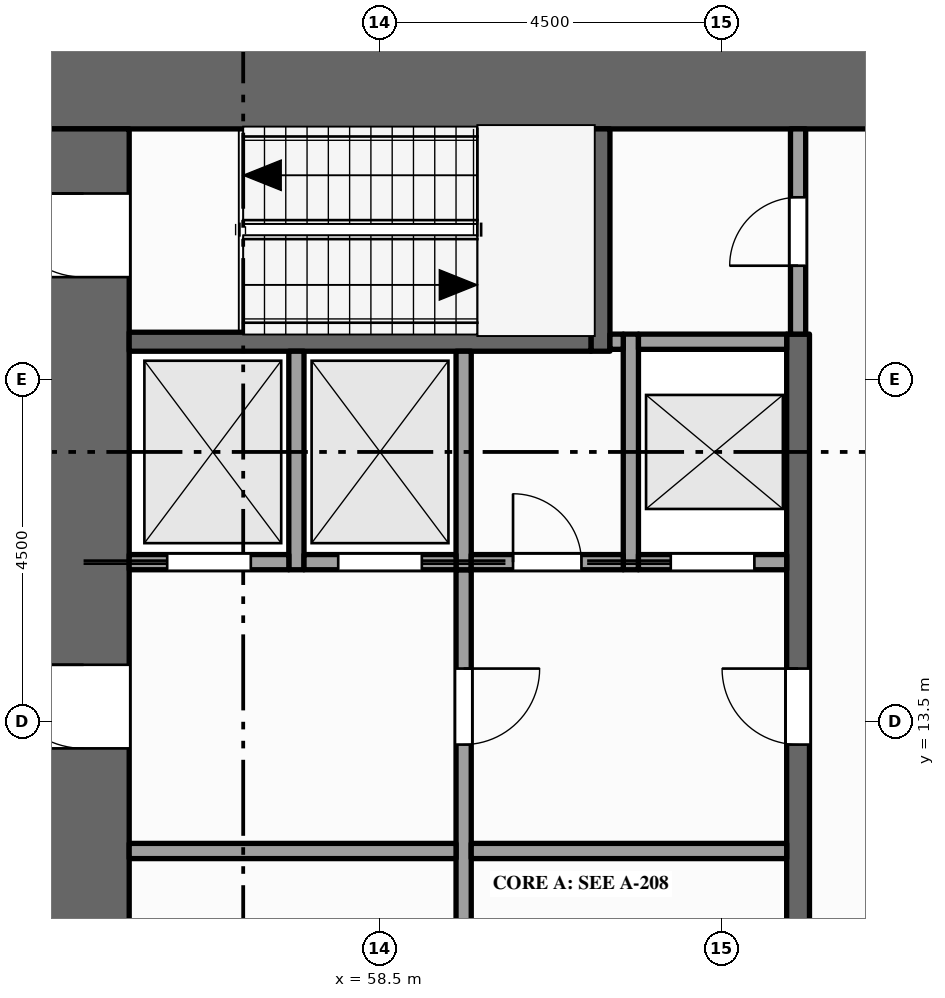
"""IFC4 building model, lengths in metres.
Left out: names, types, materials, properties, quantities, classifications, styles, units other than length and angle.
Written with IfcOpenShell. Run it as: python <this file> out.ifc"""

import sys

from ifc_helpers import new_model, si_unit, direction, frame, frame_2d, origin, place, context, subcontext, project, spatial, rectangle, extrude, element, fill, save


model = new_model("IFC4")
c1 = context("Model", 3, precision=1e-05, world=origin(), true_north=direction((0.0, 1.0)))
c2 = subcontext(c1, "Body", "Model", "MODEL_VIEW")
j1 = project(units=[si_unit("LENGTHUNIT", "METRE"), si_unit("PLANEANGLEUNIT", "RADIAN")], contexts=[c1])
p1 = place(None, origin())
s1 = spatial("IfcSite", under=j1, at=p1, CompositionType="ELEMENT")
p2 = place(p1, origin())
s2 = spatial("IfcBuilding", under=s1, at=p2, CompositionType="ELEMENT")
p3 = place(p2, frame((0.0, 0.0, 41.0)))
s3 = spatial("IfcBuildingStorey", under=s2, at=p3, CompositionType="ELEMENT", Elevation=41.0)
p4 = place(p3, frame((54.0, 21.9, -0.15), z_axis=(0.0, 0.0, 1.0), x_axis=(1.0, 0.0, 0.0)))
e1 = element("IfcWall", 1, at=p4, inside=s3, PredefinedType="SHEAR", context=c2, shape_type="SweptSolid", body=[
    extrude(rectangle(XDim=13.5, YDim=1.2, at=frame_2d((6.75, 0.0))), origin(), (0.0, 0.0, 1.0), 4.0),
])
p5 = place(p3, frame((54.6, 1.2, -0.15), z_axis=(0.0, 0.0, 1.0), x_axis=(0.0, 1.0, 0.0)))
e2 = element("IfcWall", 2, at=p5, inside=s3, PredefinedType="SHEAR", context=c2, shape_type="SweptSolid", body=[
    extrude(rectangle(XDim=20.1, YDim=1.2, at=frame_2d((10.05, 0.0))), origin(), (0.0, 0.0, 1.0), 4.0),
])
p6 = place(p5, frame((5.9, 0.0, 0.15)))
e3 = element("IfcOpeningElement", 3, at=p6, cuts=e2, PredefinedType="OPENING", context=c2, shape_type="SweptSolid", body=[
    extrude(rectangle(XDim=1.8, YDim=2.1, at=frame_2d((0.9, 1.05))), frame((0.0, 0.61, 0.0), z_axis=(0.0, -1.0, 0.0), x_axis=(1.0, 0.0, 0.0)), (0.0, 0.0, 1.0), 1.22),
])
p7 = place(p5, frame((11.95, 0.0, 0.15)))
e4 = element("IfcOpeningElement", 4, at=p7, cuts=e2, PredefinedType="OPENING", context=c2, shape_type="SweptSolid", body=[
    extrude(rectangle(XDim=1.1, YDim=2.1, at=frame_2d((0.55, 1.05))), frame((0.0, 0.61, 0.0), z_axis=(0.0, -1.0, 0.0), x_axis=(1.0, 0.0, 0.0)), (0.0, 0.0, 1.0), 1.22),
])
p8 = place(p5, frame((0.95, 0.0, 0.15)))
e5 = element("IfcOpeningElement", 5, at=p8, cuts=e2, PredefinedType="OPENING", context=c2, shape_type="SweptSolid", body=[
    extrude(rectangle(XDim=1.1, YDim=2.1, at=frame_2d((0.55, 1.05))), frame((0.0, 0.61, 0.0), z_axis=(0.0, -1.0, 0.0), x_axis=(1.0, 0.0, 0.0)), (0.0, 0.0, 1.0), 1.22),
])
p9 = place(p5, frame((18.15, 0.0, 0.15)))
e6 = element("IfcOpeningElement", 6, at=p9, cuts=e2, PredefinedType="OPENING", context=c2, shape_type="SweptSolid", body=[
    extrude(rectangle(XDim=1.1, YDim=2.1, at=frame_2d((0.55, 1.05))), frame((0.0, 0.61, 0.0), z_axis=(0.0, -1.0, 0.0), x_axis=(1.0, 0.0, 0.0)), (0.0, 0.0, 1.0), 1.22),
])
p10 = place(p3, frame((57.4, 15.5, 0.0), z_axis=(0.0, 0.0, 1.0), x_axis=(0.0, 1.0, 0.0)))
e7 = element("IfcWall", 7, at=p10, inside=s3, PredefinedType="SOLIDWALL", context=c2, shape_type="SweptSolid", body=[
    extrude(rectangle(XDim=2.875, YDim=0.2, at=frame_2d((1.438, 0.0))), origin(), (0.0, 0.0, 1.0), 3.85),
])
p11 = place(p3, frame((59.6, 9.3, 0.0), z_axis=(0.0, 0.0, 1.0), x_axis=(0.0, 1.0, 0.0)))
e8 = element("IfcWall", 8, at=p11, inside=s3, PredefinedType="PARTITIONING", context=c2, shape_type="SweptSolid", body=[
    extrude(rectangle(XDim=6.2, YDim=0.2, at=frame_2d((3.1, 0.0))), origin(), (0.0, 0.0, 1.0), 3.85),
])
p12 = place(p11, frame((3.9, 0.0, 0.0)))
e9 = element("IfcOpeningElement", 9, at=p12, cuts=e8, PredefinedType="OPENING", context=c2, shape_type="SweptSolid", body=[
    extrude(rectangle(XDim=1.0, YDim=2.1, at=frame_2d((0.5, 1.05))), frame((0.0, 0.11, 0.0), z_axis=(0.0, -1.0, 0.0), x_axis=(1.0, 0.0, 0.0)), (0.0, 0.0, 1.0), 0.22),
])
p13 = place(p3, frame((59.6, 15.5, 0.0), z_axis=(0.0, 0.0, 1.0), x_axis=(0.0, 1.0, 0.0)))
e10 = element("IfcWall", 10, at=p13, inside=s3, PredefinedType="SOLIDWALL", context=c2, shape_type="SweptSolid", body=[
    extrude(rectangle(XDim=2.875, YDim=0.2, at=frame_2d((1.438, 0.0))), origin(), (0.0, 0.0, 1.0), 3.85),
])
p14 = place(p3, frame((61.4, 18.375, 0.0), z_axis=(0.0, 0.0, 1.0), x_axis=(0.0, 1.0, 0.0)))
e11 = element("IfcWall", 11, at=p14, inside=s3, PredefinedType="SHEAR", context=c2, shape_type="SweptSolid", body=[
    extrude(rectangle(XDim=2.925, YDim=0.25, at=frame_2d((1.462, 0.0))), origin(), (0.0, 0.0, 1.0), 3.85),
])
p15 = place(p3, frame((61.8, 15.5, 0.0), z_axis=(0.0, 0.0, 1.0), x_axis=(0.0, 1.0, 0.0)))
e12 = element("IfcWall", 12, at=p15, inside=s3, PredefinedType="SOLIDWALL", context=c2, shape_type="SweptSolid", body=[
    extrude(rectangle(XDim=3.1, YDim=0.2, at=frame_2d((1.55, 0.0))), origin(), (0.0, 0.0, 1.0), 3.85),
])
p16 = place(p3, frame((64.0, 4.1, 0.0), z_axis=(0.0, 0.0, 1.0), x_axis=(0.0, 1.0, 0.0)))
e13 = element("IfcWall", 13, at=p16, inside=s3, PredefinedType="SHEAR", context=c2, shape_type="SweptSolid", body=[
    extrude(rectangle(XDim=14.5, YDim=0.3, at=frame_2d((7.25, 0.0))), origin(), (0.0, 0.0, 1.0), 3.85),
])
p17 = place(p16, frame((3.4, 0.0, 0.0)))
e14 = element("IfcOpeningElement", 14, at=p17, cuts=e13, PredefinedType="OPENING", context=c2, shape_type="SweptSolid", body=[
    extrude(rectangle(XDim=1.0, YDim=2.1, at=frame_2d((0.5, 1.05))), frame((0.0, 0.16, 0.0), z_axis=(0.0, -1.0, 0.0), x_axis=(1.0, 0.0, 0.0)), (0.0, 0.0, 1.0), 0.32),
])
p18 = place(p16, frame((9.1, 0.0, 0.0)))
e15 = element("IfcOpeningElement", 15, at=p18, cuts=e13, PredefinedType="OPENING", context=c2, shape_type="SweptSolid", body=[
    extrude(rectangle(XDim=1.0, YDim=2.1, at=frame_2d((0.5, 1.05))), frame((0.0, 0.16, 0.0), z_axis=(0.0, -1.0, 0.0), x_axis=(1.0, 0.0, 0.0)), (0.0, 0.0, 1.0), 0.32),
])
p19 = place(p3, frame((64.0, 18.6, 0.0), z_axis=(0.0, 0.0, 1.0), x_axis=(0.0, 1.0, 0.0)))
e16 = element("IfcWall", 16, at=p19, inside=s3, PredefinedType="PARTITIONING", context=c2, shape_type="SweptSolid", body=[
    extrude(rectangle(XDim=2.7, YDim=0.2, at=frame_2d((1.35, 0.0))), origin(), (0.0, 0.0, 1.0), 3.85),
])
p20 = place(p19, frame((0.9, 0.0, 0.0)))
e17 = element("IfcOpeningElement", 17, at=p20, cuts=e16, PredefinedType="OPENING", context=c2, shape_type="SweptSolid", body=[
    extrude(rectangle(XDim=0.9, YDim=2.1, at=frame_2d((0.45, 1.05))), frame((0.0, 0.11, 0.0), z_axis=(0.0, -1.0, 0.0), x_axis=(1.0, 0.0, 0.0)), (0.0, 0.0, 1.0), 0.22),
])
p21 = place(p3, frame((55.2, 11.8, 0.0), z_axis=(0.0, 0.0, 1.0), x_axis=(1.0, 0.0, 0.0)))
e18 = element("IfcWall", 18, at=p21, inside=s3, PredefinedType="PARTITIONING", context=c2, shape_type="SweptSolid", body=[
    extrude(rectangle(XDim=4.3, YDim=0.2, at=frame_2d((2.15, 0.0))), origin(), (0.0, 0.0, 1.0), 3.85),
])
p22 = place(p3, frame((59.7, 11.8, 0.0), z_axis=(0.0, 0.0, 1.0), x_axis=(1.0, 0.0, 0.0)))
e19 = element("IfcWall", 19, at=p22, inside=s3, PredefinedType="PARTITIONING", context=c2, shape_type="SweptSolid", body=[
    extrude(rectangle(XDim=4.15, YDim=0.2, at=frame_2d((2.075, 0.0))), origin(), (0.0, 0.0, 1.0), 3.85),
])
p23 = place(p3, frame((55.2, 15.6, 0.0), z_axis=(0.0, 0.0, 1.0), x_axis=(1.0, 0.0, 0.0)))
e20 = element("IfcWall", 20, at=p23, inside=s3, PredefinedType="SOLIDWALL", context=c2, shape_type="SweptSolid", body=[
    extrude(rectangle(XDim=2.1, YDim=0.2, at=frame_2d((1.05, 0.0))), origin(), (0.0, 0.0, 1.0), 3.85),
])
p24 = place(p23, frame((0.5, 0.0, 0.012)))
e21 = element("IfcOpeningElement", 21, at=p24, cuts=e20, PredefinedType="OPENING", context=c2, shape_type="SweptSolid", body=[
    extrude(rectangle(XDim=1.1, YDim=2.1, at=frame_2d((0.55, 1.05))), frame((0.0, 0.11, 0.0), z_axis=(0.0, -1.0, 0.0), x_axis=(1.0, 0.0, 0.0)), (0.0, 0.0, 1.0), 0.22),
])
p25 = place(p3, frame((57.5, 15.6, 0.0), z_axis=(0.0, 0.0, 1.0), x_axis=(1.0, 0.0, 0.0)))
e22 = element("IfcWall", 22, at=p25, inside=s3, PredefinedType="SOLIDWALL", context=c2, shape_type="SweptSolid", body=[
    extrude(rectangle(XDim=2.0, YDim=0.2, at=frame_2d((1.0, 0.0))), origin(), (0.0, 0.0, 1.0), 3.85),
])
p26 = place(p25, frame((0.45, 0.0, 0.012)))
e23 = element("IfcOpeningElement", 23, at=p26, cuts=e22, PredefinedType="OPENING", context=c2, shape_type="SweptSolid", body=[
    extrude(rectangle(XDim=1.1, YDim=2.1, at=frame_2d((0.55, 1.05))), frame((0.0, 0.11, 0.0), z_axis=(0.0, -1.0, 0.0), x_axis=(1.0, 0.0, 0.0)), (0.0, 0.0, 1.0), 0.22),
])
p27 = place(p3, frame((59.7, 15.6, 0.0), z_axis=(0.0, 0.0, 1.0), x_axis=(1.0, 0.0, 0.0)))
e24 = element("IfcWall", 24, at=p27, inside=s3, PredefinedType="PARTITIONING", context=c2, shape_type="SweptSolid", body=[
    extrude(rectangle(XDim=2.0, YDim=0.2, at=frame_2d((1.0, 0.0))), origin(), (0.0, 0.0, 1.0), 3.85),
])
p28 = place(p27, frame((0.55, 0.0, 0.0)))
e25 = element("IfcOpeningElement", 25, at=p28, cuts=e24, PredefinedType="OPENING", context=c2, shape_type="SweptSolid", body=[
    extrude(rectangle(XDim=0.9, YDim=2.1, at=frame_2d((0.45, 1.05))), frame((0.0, 0.11, 0.0), z_axis=(0.0, -1.0, 0.0), x_axis=(1.0, 0.0, 0.0)), (0.0, 0.0, 1.0), 0.22),
])
p29 = place(p3, frame((61.9, 15.6, 0.0), z_axis=(0.0, 0.0, 1.0), x_axis=(1.0, 0.0, 0.0)))
e26 = element("IfcWall", 26, at=p29, inside=s3, PredefinedType="SOLIDWALL", context=c2, shape_type="SweptSolid", body=[
    extrude(rectangle(XDim=1.95, YDim=0.2, at=frame_2d((0.975, 0.0))), origin(), (0.0, 0.0, 1.0), 3.85),
])
p30 = place(p29, frame((0.425, 0.0, 0.012)))
e27 = element("IfcOpeningElement", 27, at=p30, cuts=e26, PredefinedType="OPENING", context=c2, shape_type="SweptSolid", body=[
    extrude(rectangle(XDim=1.1, YDim=2.1, at=frame_2d((0.55, 1.05))), frame((0.0, 0.11, 0.0), z_axis=(0.0, -1.0, 0.0), x_axis=(1.0, 0.0, 0.0)), (0.0, 0.0, 1.0), 0.22),
])
p31 = place(p3, frame((55.2, 18.5, 0.0), z_axis=(0.0, 0.0, 1.0), x_axis=(1.0, 0.0, 0.0)))
e28 = element("IfcWall", 28, at=p31, inside=s3, PredefinedType="SHEAR", context=c2, shape_type="SweptSolid", body=[
    extrude(rectangle(XDim=6.075, YDim=0.25, at=frame_2d((3.038, 0.0))), origin(), (0.0, 0.0, 1.0), 3.85),
])
p32 = place(p3, frame((61.525, 18.5, 0.0), z_axis=(0.0, 0.0, 1.0), x_axis=(1.0, 0.0, 0.0)))
e29 = element("IfcWall", 29, at=p32, inside=s3, PredefinedType="PARTITIONING", context=c2, shape_type="SweptSolid", body=[
    extrude(rectangle(XDim=0.175, YDim=0.2, at=frame_2d((0.087, 0.0))), origin(), (0.0, 0.0, 1.0), 3.85),
])
p33 = place(p3, frame((61.9, 18.5, 0.0), z_axis=(0.0, 0.0, 1.0), x_axis=(1.0, 0.0, 0.0)))
e30 = element("IfcWall", 30, at=p33, inside=s3, PredefinedType="SOLIDWALL", context=c2, shape_type="SweptSolid", body=[
    extrude(rectangle(XDim=1.95, YDim=0.2, at=frame_2d((0.975, 0.0))), origin(), (0.0, 0.0, 1.0), 3.85),
])
p34 = place(p24, origin())
e31 = element("IfcDoor", 31, at=p34, inside=s3, OperationType="SLIDING_TO_LEFT", PredefinedType="DOOR", context=c2, shape_type="SweptSolid", body=[
    extrude(rectangle(XDim=1.1, YDim=2.1, at=frame_2d((0.55, 1.05))), frame((0.0, 0.025, 0.0), z_axis=(0.0, -1.0, 0.0), x_axis=(1.0, 0.0, 0.0)), (0.0, 0.0, 1.0), 0.05),
])
fill(e21, e31)
p35 = place(p26, origin())
e32 = element("IfcDoor", 32, at=p35, inside=s3, OperationType="SLIDING_TO_RIGHT", PredefinedType="DOOR", context=c2, shape_type="SweptSolid", body=[
    extrude(rectangle(XDim=1.1, YDim=2.1, at=frame_2d((0.55, 1.05))), frame((0.0, 0.025, 0.0), z_axis=(0.0, -1.0, 0.0), x_axis=(1.0, 0.0, 0.0)), (0.0, 0.0, 1.0), 0.05),
])
fill(e23, e32)
p36 = place(p30, origin())
e33 = element("IfcDoor", 33, at=p36, inside=s3, OperationType="SLIDING_TO_LEFT", PredefinedType="DOOR", context=c2, shape_type="SweptSolid", body=[
    extrude(rectangle(XDim=1.1, YDim=2.1, at=frame_2d((0.55, 1.05))), frame((0.0, 0.025, 0.0), z_axis=(0.0, -1.0, 0.0), x_axis=(1.0, 0.0, 0.0)), (0.0, 0.0, 1.0), 0.05),
])
fill(e27, e33)
p37 = place(p7, origin())
e34 = element("IfcDoor", 34, at=p37, inside=s3, OperationType="SINGLE_SWING_RIGHT", PredefinedType="DOOR", context=c2, shape_type="SweptSolid", body=[
    extrude(rectangle(XDim=1.1, YDim=2.1, at=frame_2d((0.55, 1.05))), frame((0.0, 0.025, 0.0), z_axis=(0.0, -1.0, 0.0), x_axis=(1.0, 0.0, 0.0)), (0.0, 0.0, 1.0), 0.05),
])
fill(e4, e34)
p38 = place(p12, origin())
e35 = element("IfcDoor", 35, at=p38, inside=s3, OperationType="SINGLE_SWING_RIGHT", PredefinedType="DOOR", context=c2, shape_type="SweptSolid", body=[
    extrude(rectangle(XDim=1.0, YDim=2.1, at=frame_2d((0.5, 1.05))), frame((0.0, 0.025, 0.0), z_axis=(0.0, -1.0, 0.0), x_axis=(1.0, 0.0, 0.0)), (0.0, 0.0, 1.0), 0.05),
])
fill(e9, e35)
p39 = place(p18, origin())
e36 = element("IfcDoor", 36, at=p39, inside=s3, OperationType="SINGLE_SWING_RIGHT", PredefinedType="DOOR", context=c2, shape_type="SweptSolid", body=[
    extrude(rectangle(XDim=1.0, YDim=2.1, at=frame_2d((0.5, 1.05))), frame((0.0, 0.025, 0.0), z_axis=(0.0, -1.0, 0.0), x_axis=(1.0, 0.0, 0.0)), (0.0, 0.0, 1.0), 0.05),
])
fill(e15, e36)
p40 = place(p9, origin())
e37 = element("IfcDoor", 37, at=p40, inside=s3, OperationType="SINGLE_SWING_RIGHT", PredefinedType="DOOR", context=c2, shape_type="SweptSolid", body=[
    extrude(rectangle(XDim=1.1, YDim=2.1, at=frame_2d((0.55, 1.05))), frame((0.0, 0.025, 0.0), z_axis=(0.0, -1.0, 0.0), x_axis=(1.0, 0.0, 0.0)), (0.0, 0.0, 1.0), 0.05),
])
fill(e6, e37)
p41 = place(p20, origin())
e38 = element("IfcDoor", 38, at=p41, inside=s3, OperationType="SINGLE_SWING_LEFT", PredefinedType="DOOR", context=c2, shape_type="SweptSolid", body=[
    extrude(rectangle(XDim=0.9, YDim=2.1, at=frame_2d((0.45, 1.05))), frame((0.0, 0.025, 0.0), z_axis=(0.0, -1.0, 0.0), x_axis=(1.0, 0.0, 0.0)), (0.0, 0.0, 1.0), 0.05),
])
fill(e17, e38)
p42 = place(p28, origin())
e39 = element("IfcDoor", 39, at=p42, inside=s3, OperationType="SINGLE_SWING_LEFT", PredefinedType="DOOR", context=c2, shape_type="SweptSolid", body=[
    extrude(rectangle(XDim=0.9, YDim=2.1, at=frame_2d((0.45, 1.05))), frame((0.0, 0.025, 0.0), z_axis=(0.0, -1.0, 0.0), x_axis=(1.0, 0.0, 0.0)), (0.0, 0.0, 1.0), 0.05),
])
fill(e25, e39)
save(model, sys.argv[1])
